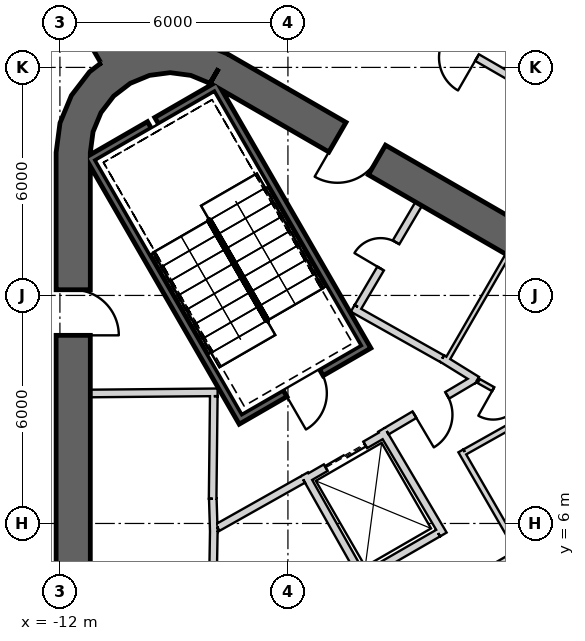
"""IFC4 building model, lengths in metres.
Left out: names, types, materials, properties, quantities, classifications, styles, units other than length and angle.
Written with IfcOpenShell. Run it as: python <this file> out.ifc"""

import sys

from ifc_helpers import new_model, si_unit, direction, frame, frame_2d, origin, place, context, subcontext, project, spatial, polyline, rectangle, outline, extrude, element, fill, save


model = new_model("IFC4")
c1 = context("Model", 3, precision=1e-05, world=origin(), true_north=direction((0.0, 1.0)))
c2 = subcontext(c1, "Body", "Model", "MODEL_VIEW")
j1 = project(units=[si_unit("LENGTHUNIT", "METRE"), si_unit("PLANEANGLEUNIT", "RADIAN")], contexts=[c1])
p1 = place(None, origin())
s1 = spatial("IfcSite", under=j1, at=p1, CompositionType="ELEMENT")
p2 = place(p1, origin())
s2 = spatial("IfcBuilding", under=s1, at=p2, CompositionType="ELEMENT")
p3 = place(p2, frame((0.0, 0.0, 163.2)))
s3 = spatial("IfcBuildingStorey", under=s2, at=p3, CompositionType="ELEMENT", Elevation=163.2)
p4 = place(p3, frame((19.475, 2.208, 0.0), z_axis=(0.0, 0.0, 1.0), x_axis=(-0.866028369851, 0.499994862586, 0.0)))
e1 = element("IfcWall", 1, at=p4, inside=s3, PredefinedType="SHEAR", context=c2, shape_type="SweptSolid", body=[
    extrude(rectangle(XDim=31.523, YDim=0.9, at=frame_2d((15.762, 0.0))), origin(), (0.0, 0.0, 1.0), 6.0),
])
p5 = place(p4, frame((3.612, 0.0, 0.0)))
e2 = element("IfcOpeningElement", 2, at=p5, cuts=e1, PredefinedType="OPENING", context=c2, shape_type="SweptSolid", body=[
    extrude(rectangle(XDim=1.2, YDim=2.4, at=frame_2d((0.6, 1.2))), frame((0.0, 0.46, 0.0), z_axis=(0.0, -1.0, 0.0), x_axis=(1.0, 0.0, 0.0)), (0.0, 0.0, 1.0), 0.92),
])
p6 = place(p4, frame((26.712, 0.0, 0.0)))
e3 = element("IfcOpeningElement", 3, at=p6, cuts=e1, PredefinedType="OPENING", context=c2, shape_type="SweptSolid", body=[
    extrude(rectangle(XDim=1.2, YDim=2.4, at=frame_2d((0.6, 1.2))), frame((0.0, 0.46, 0.0), z_axis=(0.0, -1.0, 0.0), x_axis=(1.0, 0.0, 0.0)), (0.0, 0.0, 1.0), 0.92),
])
p7 = place(p3, frame((-11.65, 15.762, 0.0), z_axis=(0.0, 0.0, 1.0), x_axis=(0.0, -1.0, 0.0)))
e4 = element("IfcWall", 4, at=p7, inside=s3, PredefinedType="SHEAR", context=c2, shape_type="SweptSolid", body=[
    extrude(rectangle(XDim=31.523, YDim=0.9, at=frame_2d((15.762, 0.0))), origin(), (0.0, 0.0, 1.0), 6.0),
])
p8 = place(p7, frame((3.612, 0.0, 0.0)))
e5 = element("IfcOpeningElement", 5, at=p8, cuts=e4, PredefinedType="OPENING", context=c2, shape_type="SweptSolid", body=[
    extrude(rectangle(XDim=1.2, YDim=2.4, at=frame_2d((0.6, 1.2))), frame((0.0, 0.46, 0.0), z_axis=(0.0, -1.0, 0.0), x_axis=(1.0, 0.0, 0.0)), (0.0, 0.0, 1.0), 0.92),
])
p9 = place(p7, frame((26.712, 0.0, 0.0)))
e6 = element("IfcOpeningElement", 6, at=p9, cuts=e4, PredefinedType="OPENING", context=c2, shape_type="SweptSolid", body=[
    extrude(rectangle(XDim=1.2, YDim=2.4, at=frame_2d((0.6, 1.2))), frame((0.0, 0.46, 0.0), z_axis=(0.0, -1.0, 0.0), x_axis=(1.0, 0.0, 0.0)), (0.0, 0.0, 1.0), 0.92),
])
p10 = place(p3, origin())
e7 = element("IfcWall", 7, at=p10, inside=s3, PredefinedType="SHEAR", context=c2, shape_type="SweptSolid", body=[
    extrude(outline(polyline([(-7.6, 18.36), (-8.323, 18.659), (-9.1, 18.762), (-9.876, 18.659), (-10.6, 18.36), (-11.221, 17.883), (-11.698, 17.262), (-11.998, 16.538), (-12.1, 15.762), (-11.2, 15.762), (-11.128, 16.305), (-10.919, 16.812), (-10.585, 17.247), (-10.15, 17.58), (-9.644, 17.79), (-9.1, 17.862), (-8.556, 17.79), (-8.05, 17.58), (-7.6, 18.36)])), origin(), (0.0, 0.0, 1.0), 6.0),
])
p11 = place(p3, frame((-10.575, 18.316, 0.0), z_axis=(0.0, 0.0, 1.0), x_axis=(-0.500002326941, 0.86602406032, 0.0)))
e8 = element("IfcWall", 8, at=p11, inside=s3, PredefinedType="SHEAR", context=c2, shape_type="SweptSolid", body=[
    extrude(rectangle(XDim=12.384, YDim=0.8, at=frame_2d((6.192, 0.0))), origin(), (0.0, 0.0, 1.0), 6.0),
])
p12 = place(p11, frame((1.2, 0.0, 0.0)))
e9 = element("IfcOpeningElement", 9, at=p12, cuts=e8, PredefinedType="OPENING", context=c2, shape_type="SweptSolid", body=[
    extrude(rectangle(XDim=1.4, YDim=2.4, at=frame_2d((0.7, 1.2))), frame((0.0, 0.41, 0.0), z_axis=(0.0, -1.0, 0.0), x_axis=(1.0, 0.0, 0.0)), (0.0, 0.0, 1.0), 0.82),
])
p13 = place(p3, frame((29.693, 13.206, 0.0), z_axis=(0.0, 0.0, 1.0), x_axis=(-0.878694903116, 0.477383773539, 0.0)))
e10 = element("IfcWall", 10, at=p13, inside=s3, PredefinedType="SOLIDWALL", context=c2, shape_type="SweptSolid", body=[
    extrude(rectangle(XDim=38.239, YDim=0.24, at=frame_2d((19.12, 0.0))), origin(), (0.0, 0.0, 1.0), 5.7),
])
p14 = place(p3, frame((-11.2, 9.42, 0.0), z_axis=(0.0, 0.0, 1.0), x_axis=(0.999957167047, 0.009255488683, 0.0)))
e11 = element("IfcWall", 11, at=p14, inside=s3, PredefinedType="PLUMBINGWALL", context=c2, shape_type="SweptSolid", body=[
    extrude(rectangle(XDim=3.35, YDim=0.2, at=frame_2d((1.675, 0.0))), origin(), (0.0, 0.0, 1.0), 5.7),
])
p15 = place(p3, frame((-7.951, 9.35, 0.0), z_axis=(0.0, 0.0, 1.0), x_axis=(-0.011120469654, -0.999938165666, 0.0)))
e12 = element("IfcWall", 12, at=p15, inside=s3, PredefinedType="PLUMBINGWALL", context=c2, shape_type="SweptSolid", body=[
    extrude(rectangle(XDim=2.7, YDim=0.2, at=frame_2d((1.35, 0.0))), origin(), (0.0, 0.0, 1.0), 5.7),
])
p16 = place(p3, frame((-7.977, 6.65, 0.0), z_axis=(0.0, 0.0, 1.0), x_axis=(0.030861509705, -0.999523670164, 0.0)))
e13 = element("IfcWall", 13, at=p16, inside=s3, PredefinedType="PLUMBINGWALL", context=c2, shape_type="SweptSolid", body=[
    extrude(rectangle(XDim=0.878, YDim=0.2, at=frame_2d((0.439, 0.0))), origin(), (0.0, 0.0, 1.0), 5.7),
])
p17 = place(p3, frame((-7.949, 5.894, 0.0), z_axis=(0.0, 0.0, 1.0), x_axis=(-0.016809909365, -0.999858703491, 0.0)))
e14 = element("IfcWall", 14, at=p17, inside=s3, PredefinedType="PLUMBINGWALL", context=c2, shape_type="SweptSolid", body=[
    extrude(rectangle(XDim=1.844, YDim=0.2, at=frame_2d((0.922, 0.0))), origin(), (0.0, 0.0, 1.0), 5.7),
])
p18 = place(p3, frame((-11.245, 15.678, -0.35), z_axis=(0.0, 0.0, 1.0), x_axis=(0.499977274689, -0.866038523851, 0.0)))
e15 = element("IfcWall", 15, at=p18, inside=s3, PredefinedType="SHEAR", context=c2, shape_type="SweptSolid", body=[
    extrude(rectangle(XDim=8.1, YDim=0.2, at=frame_2d((4.05, 0.0))), origin(), (0.0, 0.0, 1.0), 6.05),
])
p19 = place(p3, frame((-7.818, 17.541, -0.35), z_axis=(0.0, 0.0, 1.0), x_axis=(-0.866088799389, -0.499890179513, 0.0)))
e16 = element("IfcWall", 16, at=p19, inside=s3, PredefinedType="SHEAR", context=c2, shape_type="SweptSolid", body=[
    extrude(rectangle(XDim=1.89, YDim=0.2, at=frame_2d((0.945, 0.0))), origin(), (0.0, 0.0, 1.0), 6.05),
])
p20 = place(p3, frame((-9.645, 16.486, -0.35), z_axis=(0.0, 0.0, 1.0), x_axis=(-0.866038843867, -0.499976720371, 0.0)))
e17 = element("IfcWall", 17, at=p20, inside=s3, PredefinedType="SHEAR", context=c2, shape_type="SweptSolid", body=[
    extrude(rectangle(XDim=1.69, YDim=0.2, at=frame_2d((0.845, 0.0))), origin(), (0.0, 0.0, 1.0), 6.05),
])
p21 = place(p3, frame((-7.854, 17.405, -0.35), z_axis=(0.0, 0.0, 1.0), x_axis=(0.499997992926, -0.866026562566, 0.0)))
e18 = element("IfcWall", 18, at=p21, inside=s3, PredefinedType="SHEAR", context=c2, shape_type="SweptSolid", body=[
    extrude(rectangle(XDim=7.9, YDim=0.2, at=frame_2d((3.95, 0.0))), origin(), (0.0, 0.0, 1.0), 6.05),
])
p22 = place(p3, frame((-7.159, 8.8, -0.35), z_axis=(0.0, 0.0, 1.0), x_axis=(0.866047807691, 0.499961193289, 0.0)))
e19 = element("IfcWall", 19, at=p22, inside=s3, PredefinedType="SHEAR", context=c2, shape_type="SweptSolid", body=[
    extrude(rectangle(XDim=3.6, YDim=0.2, at=frame_2d((1.8, 0.0))), origin(), (0.0, 0.0, 1.0), 6.05),
])
p23 = place(p22, frame((1.25, 0.0, 0.35)))
e20 = element("IfcOpeningElement", 20, at=p23, cuts=e19, PredefinedType="OPENING", context=c2, shape_type="SweptSolid", body=[
    extrude(rectangle(XDim=1.1, YDim=2.1, at=frame_2d((0.55, 1.05))), frame((0.0, 0.11, 0.0), z_axis=(0.0, -1.0, 0.0), x_axis=(1.0, 0.0, 0.0)), (0.0, 0.0, 1.0), 0.22),
])
p24 = place(p3, frame((-5.524, 7.168, 0.0), z_axis=(0.0, 0.0, 1.0), x_axis=(0.866024647952, 0.500001309137, 0.0)))
e21 = element("IfcWall", 21, at=p24, inside=s3, PredefinedType="PLUMBINGWALL", context=c2, shape_type="SweptSolid", body=[
    extrude(rectangle(XDim=2.4, YDim=0.2, at=frame_2d((1.2, 0.0))), origin(), (0.0, 0.0, 1.0), 5.7),
])
p25 = place(p24, frame((0.6, 0.0, 0.0)))
e22 = element("IfcOpeningElement", 22, at=p25, cuts=e21, PredefinedType="OPENING", context=c2, shape_type="SweptSolid", body=[
    extrude(rectangle(XDim=1.2, YDim=2.4, at=frame_2d((0.6, 1.2))), frame((0.0, 0.11, 0.0), z_axis=(0.0, -1.0, 0.0), x_axis=(1.0, 0.0, 0.0)), (0.0, 0.0, 1.0), 0.22),
])
p26 = place(p3, frame((-4.039, 4.596, 0.0), z_axis=(0.0, 0.0, 1.0), x_axis=(-0.491322718731, 0.870977603649, 0.0)))
e23 = element("IfcWall", 23, at=p26, inside=s3, PredefinedType="PLUMBINGWALL", context=c2, shape_type="SweptSolid", body=[
    extrude(rectangle(XDim=3.1, YDim=0.2, at=frame_2d((1.55, 0.0))), origin(), (0.0, 0.0, 1.0), 5.7),
])
p27 = place(p3, frame((-3.538, 8.465, 0.0), z_axis=(0.0, 0.0, 1.0), x_axis=(0.508616218331, -0.860993346345, 0.0)))
e24 = element("IfcWall", 24, at=p27, inside=s3, PredefinedType="PLUMBINGWALL", context=c2, shape_type="SweptSolid", body=[
    extrude(rectangle(XDim=3.2, YDim=0.2, at=frame_2d((1.6, 0.0))), origin(), (0.0, 0.0, 1.0), 5.7),
])
p28 = place(p3, frame((-2.047, 5.746, 0.0), z_axis=(0.0, 0.0, 1.0), x_axis=(-0.866032100247, -0.499988401207, 0.0)))
e25 = element("IfcWall", 25, at=p28, inside=s3, PredefinedType="PLUMBINGWALL", context=c2, shape_type="SweptSolid", body=[
    extrude(rectangle(XDim=2.04, YDim=0.2, at=frame_2d((1.02, 0.0))), origin(), (0.0, 0.0, 1.0), 5.7),
])
p29 = place(p3, frame((-0.22, 13.06, 0.0), z_axis=(0.0, 0.0, 1.0), x_axis=(-0.499984717929, -0.866034226713, 0.0)))
e26 = element("IfcWall", 26, at=p29, inside=s3, PredefinedType="PARTITIONING", context=c2, shape_type="SweptSolid", body=[
    extrude(rectangle(XDim=3.25, YDim=0.12, at=frame_2d((1.625, 0.0))), origin(), (0.0, 0.0, 1.0), 5.7),
])
p30 = place(p3, frame((-1.941, 10.339, 0.0), z_axis=(0.0, 0.0, 1.0), x_axis=(0.850216889117, -0.526432561171, 0.0)))
e27 = element("IfcWall", 27, at=p30, inside=s3, PredefinedType="PARTITIONING", context=c2, shape_type="SweptSolid", body=[
    extrude(rectangle(XDim=1.078, YDim=0.2, at=frame_2d((0.539, 0.0))), origin(), (0.0, 0.0, 1.0), 5.7),
])
p31 = place(p3, frame((-0.979, 9.747, 0.0), z_axis=(0.0, 0.0, 1.0), x_axis=(0.871957532922, -0.489581515972, 0.0)))
e28 = element("IfcWall", 28, at=p31, inside=s3, PredefinedType="PARTITIONING", context=c2, shape_type="SweptSolid", body=[
    extrude(rectangle(XDim=1.672, YDim=0.12, at=frame_2d((0.836, 0.0))), origin(), (0.0, 0.0, 1.0), 5.7),
])
p32 = place(p31, frame((0.436, 0.0, 0.0)))
e29 = element("IfcOpeningElement", 29, at=p32, cuts=e28, PredefinedType="OPENING", context=c2, shape_type="SweptSolid", body=[
    extrude(rectangle(XDim=0.8, YDim=2.1, at=frame_2d((0.4, 1.05))), frame((0.0, 0.07, 0.0), z_axis=(0.0, -1.0, 0.0), x_axis=(1.0, 0.0, 0.0)), (0.0, 0.0, 1.0), 0.14),
])
p33 = place(p3, frame((-4.296, 11.659, 0.0), z_axis=(0.0, 0.0, 1.0), x_axis=(0.871534483978, -0.490334215854, 0.0)))
e30 = element("IfcWall", 30, at=p33, inside=s3, PredefinedType="PARTITIONING", context=c2, shape_type="SweptSolid", body=[
    extrude(rectangle(XDim=2.7, YDim=0.2, at=frame_2d((1.35, 0.0))), origin(), (0.0, 0.0, 1.0), 5.7),
])
p34 = place(p3, frame((-2.558, 14.409, 0.0), z_axis=(0.0, 0.0, 1.0), x_axis=(-0.508018930956, -0.861345903683, 0.0)))
e31 = element("IfcWall", 31, at=p34, inside=s3, PredefinedType="PARTITIONING", context=c2, shape_type="SweptSolid", body=[
    extrude(rectangle(XDim=3.15, YDim=0.2, at=frame_2d((1.575, 0.0))), origin(), (0.0, 0.0, 1.0), 5.7),
])
p35 = place(p34, frame((1.175, 0.0, 0.0)))
e32 = element("IfcOpeningElement", 32, at=p35, cuts=e31, PredefinedType="OPENING", context=c2, shape_type="SweptSolid", body=[
    extrude(rectangle(XDim=0.8, YDim=2.1, at=frame_2d((0.4, 1.05))), frame((0.0, 0.11, 0.0), z_axis=(0.0, -1.0, 0.0), x_axis=(1.0, 0.0, 0.0)), (0.0, 0.0, 1.0), 0.22),
])
p36 = place(p3, frame((-5.6, 7.16, 0.0), z_axis=(0.0, 0.0, 1.0), x_axis=(-0.871340486379, -0.490678873396, 0.0)))
e33 = element("IfcWall", 33, at=p36, inside=s3, PredefinedType="PARTITIONING", context=c2, shape_type="SweptSolid", body=[
    extrude(rectangle(XDim=2.581, YDim=0.2, at=frame_2d((1.291, 0.0))), origin(), (0.0, 0.0, 1.0), 5.7),
])
p37 = place(p3, frame((-1.07, 9.809, 0.0), z_axis=(0.0, 0.0, 1.0), x_axis=(-0.860603293832, -0.509275927808, 0.0)))
e34 = element("IfcWall", 34, at=p37, inside=s3, PredefinedType="PARTITIONING", context=c2, shape_type="SweptSolid", body=[
    extrude(rectangle(XDim=2.708, YDim=0.2, at=frame_2d((1.354, 0.0))), origin(), (0.0, 0.0, 1.0), 5.7),
])
p38 = place(p37, frame((0.86, 0.0, 0.0)))
e35 = element("IfcOpeningElement", 35, at=p38, cuts=e34, PredefinedType="OPENING", context=c2, shape_type="SweptSolid", body=[
    extrude(rectangle(XDim=1.0, YDim=2.1, at=frame_2d((0.5, 1.05))), frame((0.0, 0.11, 0.0), z_axis=(0.0, -1.0, 0.0), x_axis=(1.0, 0.0, 0.0)), (0.0, 0.0, 1.0), 0.22),
])
p39 = place(p3, frame((0.153, 5.285, 0.0), z_axis=(0.0, 0.0, 1.0), x_axis=(-0.866033964044, -0.499985172903, 0.0)))
e36 = element("IfcWall", 36, at=p39, inside=s3, PredefinedType="PLUMBINGWALL", context=c2, shape_type="SweptSolid", body=[
    extrude(rectangle(XDim=1.85, YDim=0.15, at=frame_2d((0.925, 0.0))), origin(), (0.0, 0.0, 1.0), 5.7),
])
p40 = place(p3, frame((-1.449, 7.91, 0.0), z_axis=(0.0, 0.0, 1.0), x_axis=(0.499990139034, -0.866031096941, 0.0)))
e37 = element("IfcWall", 37, at=p40, inside=s3, PredefinedType="PLUMBINGWALL", context=c2, shape_type="SweptSolid", body=[
    extrude(rectangle(XDim=3.0, YDim=0.15, at=frame_2d((1.5, 0.0))), origin(), (0.0, 0.0, 1.0), 5.7),
])
p41 = place(p3, frame((0.475, 8.905, 0.0), z_axis=(0.0, 0.0, 1.0), x_axis=(-0.871843752163, -0.489784107353, 0.0)))
e38 = element("IfcWall", 38, at=p41, inside=s3, PredefinedType="PLUMBINGWALL", context=c2, shape_type="SweptSolid", body=[
    extrude(rectangle(XDim=2.09, YDim=0.15, at=frame_2d((1.045, 0.0))), origin(), (0.0, 0.0, 1.0), 5.7),
])
p42 = place(p3, frame((1.617, 16.733, 0.0), z_axis=(0.0, 0.0, 1.0), x_axis=(-0.866020444499, 0.500008589636, 0.0)))
e39 = element("IfcWall", 39, at=p42, inside=s3, PredefinedType="PARTITIONING", context=c2, shape_type="SweptSolid", body=[
    extrude(rectangle(XDim=7.017, YDim=0.2, at=frame_2d((3.508, 0.0))), origin(), (0.0, 0.0, 1.0), 4.98),
])
p43 = place(p42, frame((3.05, 0.0, 0.0)))
e40 = element("IfcOpeningElement", 40, at=p43, cuts=e39, PredefinedType="OPENING", context=c2, shape_type="SweptSolid", body=[
    extrude(rectangle(XDim=1.0, YDim=2.1, at=frame_2d((0.5, 1.05))), frame((0.0, 0.11, 0.0), z_axis=(0.0, -1.0, 0.0), x_axis=(1.0, 0.0, 0.0)), (0.0, 0.0, 1.0), 0.22),
])
p44 = place(p23, origin())
e41 = element("IfcDoor", 41, at=p44, inside=s3, OperationType="SINGLE_SWING_LEFT", PredefinedType="USERDEFINED", context=c2, shape_type="SweptSolid", body=[
    extrude(rectangle(XDim=1.1, YDim=2.1, at=frame_2d((0.55, 1.05))), frame((0.0, 0.025, 0.0), z_axis=(0.0, -1.0, 0.0), x_axis=(1.0, 0.0, 0.0)), (0.0, 0.0, 1.0), 0.05),
])
fill(e20, e41)
p45 = place(p38, origin())
e42 = element("IfcDoor", 42, at=p45, inside=s3, OperationType="SINGLE_SWING_RIGHT", PredefinedType="USERDEFINED", context=c2, shape_type="SweptSolid", body=[
    extrude(rectangle(XDim=1.0, YDim=2.1, at=frame_2d((0.5, 1.05))), frame((0.0, 0.025, 0.0), z_axis=(0.0, -1.0, 0.0), x_axis=(1.0, 0.0, 0.0)), (0.0, 0.0, 1.0), 0.05),
])
fill(e35, e42)
p46 = place(p25, origin())
e43 = element("IfcDoor", 43, at=p46, inside=s3, OperationType="SLIDING_TO_LEFT", PredefinedType="USERDEFINED", context=c2, shape_type="SweptSolid", body=[
    extrude(rectangle(XDim=1.2, YDim=2.4, at=frame_2d((0.6, 1.2))), frame((0.0, 0.025, 0.0), z_axis=(0.0, -1.0, 0.0), x_axis=(1.0, 0.0, 0.0)), (0.0, 0.0, 1.0), 0.05),
])
fill(e22, e43)
p47 = place(p32, origin())
e44 = element("IfcDoor", 44, at=p47, inside=s3, OperationType="SINGLE_SWING_LEFT", PredefinedType="USERDEFINED", context=c2, shape_type="SweptSolid", body=[
    extrude(rectangle(XDim=0.8, YDim=2.1, at=frame_2d((0.4, 1.05))), frame((0.0, 0.025, 0.0), z_axis=(0.0, -1.0, 0.0), x_axis=(1.0, 0.0, 0.0)), (0.0, 0.0, 1.0), 0.05),
])
fill(e29, e44)
p48 = place(p35, origin())
e45 = element("IfcDoor", 45, at=p48, inside=s3, OperationType="SINGLE_SWING_RIGHT", PredefinedType="USERDEFINED", context=c2, shape_type="SweptSolid", body=[
    extrude(rectangle(XDim=0.8, YDim=2.1, at=frame_2d((0.4, 1.05))), frame((0.0, 0.025, 0.0), z_axis=(0.0, -1.0, 0.0), x_axis=(1.0, 0.0, 0.0)), (0.0, 0.0, 1.0), 0.05),
])
fill(e32, e45)
p49 = place(p43, origin())
e46 = element("IfcDoor", 46, at=p49, inside=s3, OperationType="SINGLE_SWING_LEFT", PredefinedType="USERDEFINED", context=c2, shape_type="SweptSolid", body=[
    extrude(rectangle(XDim=1.0, YDim=2.1, at=frame_2d((0.5, 1.05))), frame((0.0, 0.025, 0.0), z_axis=(0.0, -1.0, 0.0), x_axis=(1.0, 0.0, 0.0)), (0.0, 0.0, 1.0), 0.05),
])
fill(e40, e46)
p50 = place(p6, origin())
e47 = element("IfcDoor", 47, at=p50, inside=s3, OperationType="SINGLE_SWING_RIGHT", PredefinedType="USERDEFINED", context=c2, shape_type="SweptSolid", body=[
    extrude(rectangle(XDim=1.2, YDim=2.4, at=frame_2d((0.6, 1.2))), frame((0.0, 0.025, 0.0), z_axis=(0.0, -1.0, 0.0), x_axis=(1.0, 0.0, 0.0)), (0.0, 0.0, 1.0), 0.05),
])
fill(e3, e47)
p51 = place(p8, origin())
e48 = element("IfcDoor", 48, at=p51, inside=s3, OperationType="SINGLE_SWING_RIGHT", PredefinedType="USERDEFINED", context=c2, shape_type="SweptSolid", body=[
    extrude(rectangle(XDim=1.2, YDim=2.4, at=frame_2d((0.6, 1.2))), frame((0.0, 0.025, 0.0), z_axis=(0.0, -1.0, 0.0), x_axis=(1.0, 0.0, 0.0)), (0.0, 0.0, 1.0), 0.05),
])
fill(e5, e48)
save(model, sys.argv[1])
